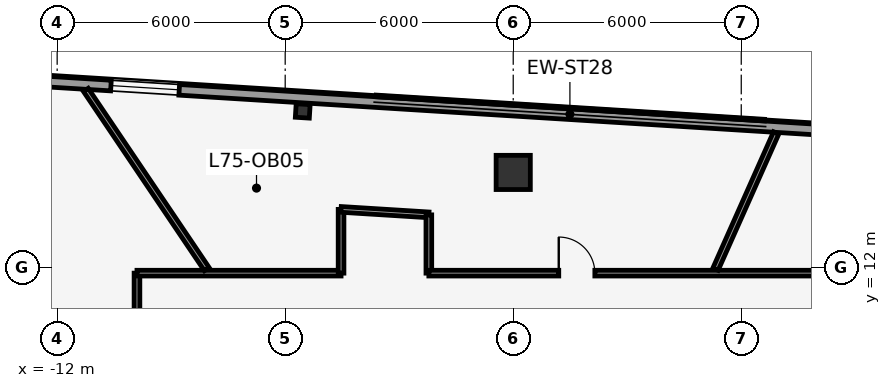
"""IFC4 building model, lengths in metres.
Left out: names, types, materials, properties, quantities, classifications, styles, units other than length and angle.
Written with IfcOpenShell. Run it as: python <this file> out.ifc"""

import sys

from ifc_helpers import new_model, si_unit, direction, frame, frame_2d, origin, origin_2d, place, context, subcontext, project, spatial, rectangle, i_section, extrude, element, fill, save


model = new_model("IFC4")
c1 = context("Model", 3, precision=1e-05, world=origin(), true_north=direction((0.0, 1.0)))
c2 = subcontext(c1, "Body", "Model", "MODEL_VIEW")
j1 = project(units=[si_unit("LENGTHUNIT", "METRE"), si_unit("PLANEANGLEUNIT", "RADIAN")], contexts=[c1])
p1 = place(None, origin())
s1 = spatial("IfcSite", under=j1, at=p1, CompositionType="ELEMENT")
p2 = place(p1, origin())
s2 = spatial("IfcBuilding", under=s1, at=p2, CompositionType="ELEMENT")
p3 = place(p2, frame((0.0, 0.0, 318.8)))
s3 = spatial("IfcBuildingStorey", under=s2, at=p3, CompositionType="ELEMENT", Elevation=318.8)
p4 = place(p3, frame((0.0, 14.5, 0.0), z_axis=(0.0, 0.0, 1.0), x_axis=(1.0, 0.0, 0.0)))
e1 = element("IfcColumn", 1, at=p4, inside=s3, PredefinedType="COLUMN", context=c2, shape_type="SweptSolid", body=[
    extrude(rectangle(XDim=0.9, YDim=0.9, at=origin_2d()), origin(), (0.0, 0.0, 1.0), 4.6),
])
p5 = place(p3, frame((-5.538, 16.118, 0.0), z_axis=(0.0, 0.0, 1.0), x_axis=(-0.998081143466, 0.061919553109, 0.0)))
e2 = element("IfcColumn", 2, at=p5, inside=s3, PredefinedType="COLUMN", context=c2, shape_type="SweptSolid", body=[
    extrude(i_section(OverallWidth=0.368, OverallDepth=0.356, WebThickness=0.011, FlangeThickness=0.018, at=origin_2d()), origin(), (0.0, 0.0, 1.0), 4.6),
])
p6 = place(p3, frame((-20.056, 17.376, 0.0), z_axis=(0.0, 0.0, 1.0), x_axis=(0.998061236898, -0.06223959674, 0.0)))
e3 = element("IfcWall", 3, at=p6, inside=s3, PredefinedType="STANDARD", context=c2, shape_type="SweptSolid", body=[
    extrude(rectangle(XDim=43.18, YDim=0.28, at=frame_2d((21.59, 0.0))), origin(), (0.0, 0.0, 1.0), 4.32),
])
p7 = place(p6, frame((3.89, 0.0, 0.85)))
e4 = element("IfcOpeningElement", 4, at=p7, cuts=e3, PredefinedType="OPENING", context=c2, shape_type="SweptSolid", body=[
    extrude(rectangle(XDim=1.8, YDim=2.4, at=frame_2d((0.9, 1.2))), frame((0.0, 0.15, 0.0), z_axis=(0.0, -1.0, 0.0), x_axis=(1.0, 0.0, 0.0)), (0.0, 0.0, 1.0), 0.3),
])
p8 = place(p6, frame((9.49, 0.0, 0.85)))
e5 = element("IfcOpeningElement", 5, at=p8, cuts=e3, PredefinedType="OPENING", context=c2, shape_type="SweptSolid", body=[
    extrude(rectangle(XDim=1.8, YDim=2.4, at=frame_2d((0.9, 1.2))), frame((0.0, 0.15, 0.0), z_axis=(0.0, -1.0, 0.0), x_axis=(1.0, 0.0, 0.0)), (0.0, 0.0, 1.0), 0.3),
])
p9 = place(p6, frame((31.89, 0.0, 0.85)))
e6 = element("IfcOpeningElement", 6, at=p9, cuts=e3, PredefinedType="OPENING", context=c2, shape_type="SweptSolid", body=[
    extrude(rectangle(XDim=1.8, YDim=2.4, at=frame_2d((0.9, 1.2))), frame((0.0, 0.15, 0.0), z_axis=(0.0, -1.0, 0.0), x_axis=(1.0, 0.0, 0.0)), (0.0, 0.0, 1.0), 0.3),
])
p10 = place(p6, frame((37.49, 0.0, 0.85)))
e7 = element("IfcOpeningElement", 7, at=p10, cuts=e3, PredefinedType="OPENING", context=c2, shape_type="SweptSolid", body=[
    extrude(rectangle(XDim=1.8, YDim=2.4, at=frame_2d((0.9, 1.2))), frame((0.0, 0.15, 0.0), z_axis=(0.0, -1.0, 0.0), x_axis=(1.0, 0.0, 0.0)), (0.0, 0.0, 1.0), 0.3),
])
p11 = place(p3, frame((-4.988, -26.865, 0.0), z_axis=(0.0, 0.0, 1.0), x_axis=(-0.431592936847, 0.902068476815, 0.0)))
e8 = element("IfcWall", 8, at=p11, inside=s3, PredefinedType="STANDARD", context=c2, shape_type="SweptSolid", body=[
    extrude(rectangle(XDim=43.18, YDim=0.28, at=frame_2d((21.59, 0.0))), origin(), (0.0, 0.0, 1.0), 4.32),
])
p12 = place(p11, frame((18.499, 0.0, 0.0)))
e9 = element("IfcOpeningElement", 9, at=p12, cuts=e8, PredefinedType="OPENING", context=c2, shape_type="SweptSolid", body=[
    extrude(rectangle(XDim=1.0, YDim=2.15, at=frame_2d((0.5, 1.075))), frame((0.0, 0.15, 0.0), z_axis=(0.0, -1.0, 0.0), x_axis=(1.0, 0.0, 0.0)), (0.0, 0.0, 1.0), 0.3),
])
p13 = place(p11, frame((9.49, 0.0, 0.85)))
e10 = element("IfcOpeningElement", 10, at=p13, cuts=e8, PredefinedType="OPENING", context=c2, shape_type="SweptSolid", body=[
    extrude(rectangle(XDim=1.8, YDim=2.4, at=frame_2d((0.9, 1.2))), frame((0.0, 0.15, 0.0), z_axis=(0.0, -1.0, 0.0), x_axis=(1.0, 0.0, 0.0)), (0.0, 0.0, 1.0), 0.3),
])
p14 = place(p11, frame((31.89, 0.0, 0.85)))
e11 = element("IfcOpeningElement", 11, at=p14, cuts=e8, PredefinedType="OPENING", context=c2, shape_type="SweptSolid", body=[
    extrude(rectangle(XDim=1.8, YDim=2.4, at=frame_2d((0.9, 1.2))), frame((0.0, 0.15, 0.0), z_axis=(0.0, -1.0, 0.0), x_axis=(1.0, 0.0, 0.0)), (0.0, 0.0, 1.0), 0.3),
])
p15 = place(p11, frame((37.49, 0.0, 0.85)))
e12 = element("IfcOpeningElement", 12, at=p15, cuts=e8, PredefinedType="OPENING", context=c2, shape_type="SweptSolid", body=[
    extrude(rectangle(XDim=1.8, YDim=2.4, at=frame_2d((0.9, 1.2))), frame((0.0, 0.15, 0.0), z_axis=(0.0, -1.0, 0.0), x_axis=(1.0, 0.0, 0.0)), (0.0, 0.0, 1.0), 0.3),
])
p16 = place(p3, frame((-9.9, -9.937, 0.0), z_axis=(0.0, 0.0, 1.0), x_axis=(0.0, 1.0, 0.0)))
e13 = element("IfcWall", 13, at=p16, inside=s3, PredefinedType="PARTITIONING", context=c2, shape_type="SweptSolid", body=[
    extrude(rectangle(XDim=21.787, YDim=0.15, at=frame_2d((10.894, 0.0))), origin(), (0.0, 0.0, 1.0), 4.32),
])
p17 = place(p16, frame((3.919, 0.0, 0.0)))
e14 = element("IfcOpeningElement", 14, at=p17, cuts=e13, PredefinedType="OPENING", context=c2, shape_type="SweptSolid", body=[
    extrude(rectangle(XDim=0.95, YDim=2.15, at=frame_2d((0.475, 1.075))), frame((0.0, 0.085, 0.0), z_axis=(0.0, -1.0, 0.0), x_axis=(1.0, 0.0, 0.0)), (0.0, 0.0, 1.0), 0.17),
])
p18 = place(p16, frame((14.558, 0.0, 0.0)))
e15 = element("IfcOpeningElement", 15, at=p18, cuts=e13, PredefinedType="OPENING", context=c2, shape_type="SweptSolid", body=[
    extrude(rectangle(XDim=0.95, YDim=2.15, at=frame_2d((0.475, 1.075))), frame((0.0, 0.085, 0.0), z_axis=(0.0, -1.0, 0.0), x_axis=(1.0, 0.0, 0.0)), (0.0, 0.0, 1.0), 0.17),
])
p19 = place(p3, frame((-9.9, 11.85, 0.0), z_axis=(0.0, 0.0, 1.0), x_axis=(1.0, 0.0, 0.0)))
e16 = element("IfcWall", 16, at=p19, inside=s3, PredefinedType="PARTITIONING", context=c2, shape_type="SweptSolid", body=[
    extrude(rectangle(XDim=5.37, YDim=0.15, at=frame_2d((2.685, 0.0))), origin(), (0.0, 0.0, 1.0), 4.32),
])
p20 = place(p3, frame((-4.53, 11.85, 0.0), z_axis=(0.0, 0.0, 1.0), x_axis=(0.0, 1.0, 0.0)))
e17 = element("IfcWall", 17, at=p20, inside=s3, PredefinedType="PARTITIONING", context=c2, shape_type="SweptSolid", body=[
    extrude(rectangle(XDim=1.677, YDim=0.15, at=frame_2d((0.839, 0.0))), origin(), (0.0, 0.0, 1.0), 4.32),
])
p21 = place(p3, frame((-4.53, 13.527, 0.0), z_axis=(0.0, 0.0, 1.0), x_axis=(0.998061597532, -0.062233813416, 0.0)))
e18 = element("IfcWall", 18, at=p21, inside=s3, PredefinedType="PARTITIONING", context=c2, shape_type="SweptSolid", body=[
    extrude(rectangle(XDim=2.314, YDim=0.15, at=frame_2d((1.157, 0.0))), origin(), (0.0, 0.0, 1.0), 4.32),
])
p22 = place(p3, frame((-2.22, 13.383, 0.0), z_axis=(0.0, 0.0, 1.0), x_axis=(0.0, -1.0, 0.0)))
e19 = element("IfcWall", 19, at=p22, inside=s3, PredefinedType="PARTITIONING", context=c2, shape_type="SweptSolid", body=[
    extrude(rectangle(XDim=1.533, YDim=0.15, at=frame_2d((0.767, 0.0))), origin(), (0.0, 0.0, 1.0), 4.32),
])
p23 = place(p3, frame((-2.22, 11.85, 0.0), z_axis=(0.0, 0.0, 1.0), x_axis=(1.0, 0.0, 0.0)))
e20 = element("IfcWall", 20, at=p23, inside=s3, PredefinedType="PARTITIONING", context=c2, shape_type="SweptSolid", body=[
    extrude(rectangle(XDim=12.12, YDim=0.15, at=frame_2d((6.06, 0.0))), origin(), (0.0, 0.0, 1.0), 4.32),
])
p24 = place(p23, frame((3.418, 0.0, 0.0)))
e21 = element("IfcOpeningElement", 21, at=p24, cuts=e20, PredefinedType="OPENING", context=c2, shape_type="SweptSolid", body=[
    extrude(rectangle(XDim=0.95, YDim=2.15, at=frame_2d((0.475, 1.075))), frame((0.0, 0.085, 0.0), z_axis=(0.0, -1.0, 0.0), x_axis=(1.0, 0.0, 0.0)), (0.0, 0.0, 1.0), 0.17),
])
p25 = place(p3, frame((5.323, 11.955, 0.0), z_axis=(0.0, 0.0, 1.0), x_axis=(0.406710056431, 0.913557294316, 0.0)))
e22 = element("IfcWall", 22, at=p25, inside=s3, PredefinedType="PARTITIONING", context=c2, shape_type="SweptSolid", body=[
    extrude(rectangle(XDim=3.923, YDim=0.15, at=frame_2d((1.961, 0.0))), origin(), (0.0, 0.0, 1.0), 4.32),
])
p26 = place(p3, frame((-8.064, 11.955, 0.0), z_axis=(0.0, 0.0, 1.0), x_axis=(-0.559217811097, 0.829020771604, 0.0)))
e23 = element("IfcWall", 23, at=p26, inside=s3, PredefinedType="PARTITIONING", context=c2, shape_type="SweptSolid", body=[
    extrude(rectangle(XDim=5.689, YDim=0.15, at=frame_2d((2.844, 0.0))), origin(), (0.0, 0.0, 1.0), 4.32),
])
p27 = place(p8, origin())
e24 = element("IfcWindow", 24, at=p27, inside=s3, PartitioningType="DOUBLE_PANEL_VERTICAL", PredefinedType="WINDOW", context=c2, shape_type="SweptSolid", body=[
    extrude(rectangle(XDim=1.8, YDim=2.4, at=frame_2d((0.9, 1.2))), frame((0.0, 0.03, 0.0), z_axis=(0.0, -1.0, 0.0), x_axis=(1.0, 0.0, 0.0)), (0.0, 0.0, 1.0), 0.06),
])
fill(e5, e24)
p28 = place(p24, origin())
e25 = element("IfcDoor", 25, at=p28, inside=s3, OperationType="SINGLE_SWING_LEFT", PredefinedType="DOOR", context=c2, shape_type="SweptSolid", body=[
    extrude(rectangle(XDim=0.95, YDim=2.15, at=frame_2d((0.475, 1.075))), frame((0.0, 0.025, 0.0), z_axis=(0.0, -1.0, 0.0), x_axis=(1.0, 0.0, 0.0)), (0.0, 0.0, 1.0), 0.05),
])
fill(e21, e25)
save(model, sys.argv[1])
